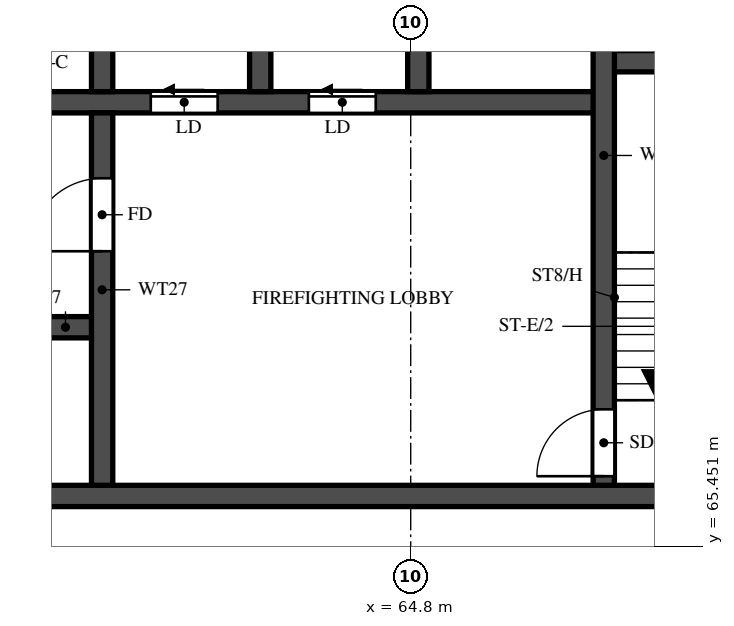
"""IFC4 building model, lengths in metres.
Left out: names, types, materials, properties, quantities, classifications, styles, units other than length and angle.
Written with IfcOpenShell. Run it as: python <this file> out.ifc"""

import sys

from ifc_helpers import new_model, si_unit, direction, frame, frame_2d, origin, place, context, subcontext, project, spatial, rectangle, extrude, element, fill, save


model = new_model("IFC4")
c1 = context("Model", 3, precision=1e-05, world=origin(), true_north=direction((0.0, 1.0)))
c2 = subcontext(c1, "Body", "Model", "MODEL_VIEW")
j1 = project(units=[si_unit("LENGTHUNIT", "METRE"), si_unit("PLANEANGLEUNIT", "RADIAN")], contexts=[c1])
p1 = place(None, origin())
s1 = spatial("IfcSite", under=j1, at=p1, CompositionType="ELEMENT")
p2 = place(p1, origin())
s2 = spatial("IfcBuilding", under=s1, at=p2, CompositionType="ELEMENT")
p3 = place(p2, frame((0.0, 0.0, 181.5)))
s3 = spatial("IfcBuildingStorey", under=s2, at=p3, CompositionType="ELEMENT", Elevation=181.5)
p4 = place(p3, frame((29.7, 66.275, 0.0), z_axis=(0.0, 0.0, 1.0), x_axis=(1.0, 0.0, 0.0)))
e1 = element("IfcWall", 1, at=p4, inside=s3, PredefinedType="SHEAR", context=c2, shape_type="SweptSolid", body=[
    extrude(rectangle(XDim=41.4, YDim=0.35, at=frame_2d((20.7, 0.0))), origin(), (0.0, 0.0, 1.0), 3.2),
])
p5 = place(p4, frame((0.925, 0.0, 0.0)))
e2 = element("IfcOpeningElement", 2, at=p5, cuts=e1, PredefinedType="OPENING", context=c2, shape_type="SweptSolid", body=[
    extrude(rectangle(XDim=1.1, YDim=2.1, at=frame_2d((0.55, 1.05))), frame((0.0, 0.185, 0.0), z_axis=(0.0, -1.0, 0.0), x_axis=(1.0, 0.0, 0.0)), (0.0, 0.0, 1.0), 0.37),
])
p6 = place(p4, frame((3.712, 0.0, 0.0)))
e3 = element("IfcOpeningElement", 3, at=p6, cuts=e1, PredefinedType="OPENING", context=c2, shape_type="SweptSolid", body=[
    extrude(rectangle(XDim=1.8, YDim=2.1, at=frame_2d((0.9, 1.05))), frame((0.0, 0.185, 0.0), z_axis=(0.0, -1.0, 0.0), x_axis=(1.0, 0.0, 0.0)), (0.0, 0.0, 1.0), 0.37),
])
p7 = place(p3, frame((35.625, 69.05, 0.0), z_axis=(0.0, 0.0, 1.0), x_axis=(1.0, 0.0, 0.0)))
e4 = element("IfcWall", 4, at=p7, inside=s3, PredefinedType="SHEAR", context=c2, shape_type="SweptSolid", body=[
    extrude(rectangle(XDim=24.1, YDim=0.35, at=frame_2d((12.05, 0.0))), origin(), (0.0, 0.0, 1.0), 3.2),
])
p8 = place(p7, frame((1.0, 0.0, 0.0)))
e5 = element("IfcOpeningElement", 5, at=p8, cuts=e4, PredefinedType="OPENING", context=c2, shape_type="SweptSolid", body=[
    extrude(rectangle(XDim=1.1, YDim=2.1, at=frame_2d((0.55, 1.05))), frame((0.0, 0.185, 0.0), z_axis=(0.0, -1.0, 0.0), x_axis=(1.0, 0.0, 0.0)), (0.0, 0.0, 1.0), 0.37),
])
p9 = place(p7, frame((3.75, 0.0, 0.0)))
e6 = element("IfcOpeningElement", 6, at=p9, cuts=e4, PredefinedType="OPENING", context=c2, shape_type="SweptSolid", body=[
    extrude(rectangle(XDim=1.1, YDim=2.1, at=frame_2d((0.55, 1.05))), frame((0.0, 0.185, 0.0), z_axis=(0.0, -1.0, 0.0), x_axis=(1.0, 0.0, 0.0)), (0.0, 0.0, 1.0), 0.37),
])
p10 = place(p7, frame((6.5, 0.0, 0.0)))
e7 = element("IfcOpeningElement", 7, at=p10, cuts=e4, PredefinedType="OPENING", context=c2, shape_type="SweptSolid", body=[
    extrude(rectangle(XDim=1.1, YDim=2.1, at=frame_2d((0.55, 1.05))), frame((0.0, 0.185, 0.0), z_axis=(0.0, -1.0, 0.0), x_axis=(1.0, 0.0, 0.0)), (0.0, 0.0, 1.0), 0.37),
])
p11 = place(p7, frame((9.25, 0.0, 0.0)))
e8 = element("IfcOpeningElement", 8, at=p11, cuts=e4, PredefinedType="OPENING", context=c2, shape_type="SweptSolid", body=[
    extrude(rectangle(XDim=1.1, YDim=2.1, at=frame_2d((0.55, 1.05))), frame((0.0, 0.185, 0.0), z_axis=(0.0, -1.0, 0.0), x_axis=(1.0, 0.0, 0.0)), (0.0, 0.0, 1.0), 0.37),
])
p12 = place(p7, frame((12.0, 0.0, 0.0)))
e9 = element("IfcOpeningElement", 9, at=p12, cuts=e4, PredefinedType="OPENING", context=c2, shape_type="SweptSolid", body=[
    extrude(rectangle(XDim=1.1, YDim=2.1, at=frame_2d((0.55, 1.05))), frame((0.0, 0.185, 0.0), z_axis=(0.0, -1.0, 0.0), x_axis=(1.0, 0.0, 0.0)), (0.0, 0.0, 1.0), 0.37),
])
p13 = place(p7, frame((14.75, 0.0, 0.0)))
e10 = element("IfcOpeningElement", 10, at=p13, cuts=e4, PredefinedType="OPENING", context=c2, shape_type="SweptSolid", body=[
    extrude(rectangle(XDim=1.1, YDim=2.1, at=frame_2d((0.55, 1.05))), frame((0.0, 0.185, 0.0), z_axis=(0.0, -1.0, 0.0), x_axis=(1.0, 0.0, 0.0)), (0.0, 0.0, 1.0), 0.37),
])
p14 = place(p7, frame((17.625, 0.0, 0.0)))
e11 = element("IfcOpeningElement", 11, at=p14, cuts=e4, PredefinedType="OPENING", context=c2, shape_type="SweptSolid", body=[
    extrude(rectangle(XDim=1.1, YDim=2.1, at=frame_2d((0.55, 1.05))), frame((0.0, 0.185, 0.0), z_axis=(0.0, -1.0, 0.0), x_axis=(1.0, 0.0, 0.0)), (0.0, 0.0, 1.0), 0.37),
])
p15 = place(p7, frame((20.625, 0.0, 0.0)))
e12 = element("IfcOpeningElement", 12, at=p15, cuts=e4, PredefinedType="OPENING", context=c2, shape_type="SweptSolid", body=[
    extrude(rectangle(XDim=1.1, YDim=2.1, at=frame_2d((0.55, 1.05))), frame((0.0, 0.185, 0.0), z_axis=(0.0, -1.0, 0.0), x_axis=(1.0, 0.0, 0.0)), (0.0, 0.0, 1.0), 0.37),
])
p16 = place(p3, frame((32.825, 72.75, 0.0), z_axis=(0.0, 0.0, 1.0), x_axis=(1.0, 0.0, 0.0)))
e13 = element("IfcWall", 13, at=p16, inside=s3, PredefinedType="SHEAR", context=c2, shape_type="SweptSolid", body=[
    extrude(rectangle(XDim=35.15, YDim=0.35, at=frame_2d((17.575, 0.0))), origin(), (0.0, 0.0, 1.0), 3.2),
])
p17 = place(p16, frame((19.8, 0.0, 0.0)))
e14 = element("IfcOpeningElement", 14, at=p17, cuts=e13, PredefinedType="OPENING", context=c2, shape_type="SweptSolid", body=[
    extrude(rectangle(XDim=1.1, YDim=2.1, at=frame_2d((0.55, 1.05))), frame((0.0, 0.185, 0.0), z_axis=(0.0, -1.0, 0.0), x_axis=(1.0, 0.0, 0.0)), (0.0, 0.0, 1.0), 0.37),
])
p18 = place(p16, frame((27.7, 0.0, 0.0)))
e15 = element("IfcOpeningElement", 15, at=p18, cuts=e13, PredefinedType="OPENING", context=c2, shape_type="SweptSolid", body=[
    extrude(rectangle(XDim=1.1, YDim=2.1, at=frame_2d((0.55, 1.05))), frame((0.0, 0.185, 0.0), z_axis=(0.0, -1.0, 0.0), x_axis=(1.0, 0.0, 0.0)), (0.0, 0.0, 1.0), 0.37),
])
p19 = place(p16, frame((30.3, 0.0, 0.0)))
e16 = element("IfcOpeningElement", 16, at=p19, cuts=e13, PredefinedType="OPENING", context=c2, shape_type="SweptSolid", body=[
    extrude(rectangle(XDim=1.1, YDim=2.1, at=frame_2d((0.55, 1.05))), frame((0.0, 0.185, 0.0), z_axis=(0.0, -1.0, 0.0), x_axis=(1.0, 0.0, 0.0)), (0.0, 0.0, 1.0), 0.37),
])
p20 = place(p16, frame((3.8, 0.0, 0.0)))
e17 = element("IfcOpeningElement", 17, at=p20, cuts=e13, PredefinedType="OPENING", context=c2, shape_type="SweptSolid", body=[
    extrude(rectangle(XDim=1.1, YDim=2.1, at=frame_2d((0.55, 1.05))), frame((0.0, 0.185, 0.0), z_axis=(0.0, -1.0, 0.0), x_axis=(1.0, 0.0, 0.0)), (0.0, 0.0, 1.0), 0.37),
])
p21 = place(p16, frame((6.55, 0.0, 0.0)))
e18 = element("IfcOpeningElement", 18, at=p21, cuts=e13, PredefinedType="OPENING", context=c2, shape_type="SweptSolid", body=[
    extrude(rectangle(XDim=1.1, YDim=2.1, at=frame_2d((0.55, 1.05))), frame((0.0, 0.185, 0.0), z_axis=(0.0, -1.0, 0.0), x_axis=(1.0, 0.0, 0.0)), (0.0, 0.0, 1.0), 0.37),
])
p22 = place(p16, frame((9.3, 0.0, 0.0)))
e19 = element("IfcOpeningElement", 19, at=p22, cuts=e13, PredefinedType="OPENING", context=c2, shape_type="SweptSolid", body=[
    extrude(rectangle(XDim=1.1, YDim=2.1, at=frame_2d((0.55, 1.05))), frame((0.0, 0.185, 0.0), z_axis=(0.0, -1.0, 0.0), x_axis=(1.0, 0.0, 0.0)), (0.0, 0.0, 1.0), 0.37),
])
p23 = place(p16, frame((12.05, 0.0, 0.0)))
e20 = element("IfcOpeningElement", 20, at=p23, cuts=e13, PredefinedType="OPENING", context=c2, shape_type="SweptSolid", body=[
    extrude(rectangle(XDim=1.1, YDim=2.1, at=frame_2d((0.55, 1.05))), frame((0.0, 0.185, 0.0), z_axis=(0.0, -1.0, 0.0), x_axis=(1.0, 0.0, 0.0)), (0.0, 0.0, 1.0), 0.37),
])
p24 = place(p16, frame((14.8, 0.0, 0.0)))
e21 = element("IfcOpeningElement", 21, at=p24, cuts=e13, PredefinedType="OPENING", context=c2, shape_type="SweptSolid", body=[
    extrude(rectangle(XDim=1.1, YDim=2.1, at=frame_2d((0.55, 1.05))), frame((0.0, 0.185, 0.0), z_axis=(0.0, -1.0, 0.0), x_axis=(1.0, 0.0, 0.0)), (0.0, 0.0, 1.0), 0.37),
])
p25 = place(p16, frame((17.55, 0.0, 0.0)))
e22 = element("IfcOpeningElement", 22, at=p25, cuts=e13, PredefinedType="OPENING", context=c2, shape_type="SweptSolid", body=[
    extrude(rectangle(XDim=1.1, YDim=2.1, at=frame_2d((0.55, 1.05))), frame((0.0, 0.185, 0.0), z_axis=(0.0, -1.0, 0.0), x_axis=(1.0, 0.0, 0.0)), (0.0, 0.0, 1.0), 0.37),
])
p26 = place(p16, frame((0.938, 0.0, 0.0)))
e23 = element("IfcOpeningElement", 23, at=p26, cuts=e13, PredefinedType="OPENING", context=c2, shape_type="SweptSolid", body=[
    extrude(rectangle(XDim=1.1, YDim=2.1, at=frame_2d((0.55, 1.05))), frame((0.0, 0.185, 0.0), z_axis=(0.0, -1.0, 0.0), x_axis=(1.0, 0.0, 0.0)), (0.0, 0.0, 1.0), 0.37),
])
p27 = place(p3, frame((67.975, 73.425, 0.0), z_axis=(0.0, 0.0, 1.0), x_axis=(1.0, 0.0, 0.0)))
e24 = element("IfcWall", 24, at=p27, inside=s3, PredefinedType="SHEAR", context=c2, shape_type="SweptSolid", body=[
    extrude(rectangle(XDim=3.125, YDim=0.35, at=frame_2d((1.562, 0.0))), origin(), (0.0, 0.0, 1.0), 3.2),
])
p28 = place(p3, frame((67.975, 66.45, 0.0), z_axis=(0.0, 0.0, 1.0), x_axis=(0.0, 1.0, 0.0)))
e25 = element("IfcWall", 25, at=p28, inside=s3, PredefinedType="SHEAR", context=c2, shape_type="SweptSolid", body=[
    extrude(rectangle(XDim=10.85, YDim=0.35, at=frame_2d((5.425, 0.0))), origin(), (0.0, 0.0, 1.0), 3.2),
])
p29 = place(p28, frame((0.15, 0.0, 0.0)))
e26 = element("IfcOpeningElement", 26, at=p29, cuts=e25, PredefinedType="OPENING", context=c2, shape_type="SweptSolid", body=[
    extrude(rectangle(XDim=1.1, YDim=2.1, at=frame_2d((0.55, 1.05))), frame((0.0, 0.185, 0.0), z_axis=(0.0, -1.0, 0.0), x_axis=(1.0, 0.0, 0.0)), (0.0, 0.0, 1.0), 0.37),
])
p30 = place(p3, frame((59.725, 66.45, 0.0), z_axis=(0.0, 0.0, 1.0), x_axis=(0.0, 1.0, 0.0)))
e27 = element("IfcWall", 27, at=p30, inside=s3, PredefinedType="SHEAR", context=c2, shape_type="SweptSolid", body=[
    extrude(rectangle(XDim=6.125, YDim=0.35, at=frame_2d((3.062, 0.0))), origin(), (0.0, 0.0, 1.0), 3.2),
])
p31 = place(p30, frame((3.85, 0.0, 0.0)))
e28 = element("IfcOpeningElement", 28, at=p31, cuts=e27, PredefinedType="OPENING", context=c2, shape_type="SweptSolid", body=[
    extrude(rectangle(XDim=1.2, YDim=2.1, at=frame_2d((0.6, 1.05))), frame((0.0, 0.185, 0.0), z_axis=(0.0, -1.0, 0.0), x_axis=(1.0, 0.0, 0.0)), (0.0, 0.0, 1.0), 0.37),
])
for number, where, z_axis, x_axis in (
    (29, (59.725, 72.925, 0.0), (0.0, 0.0, 1.0), (0.0, 1.0, 0.0)),
    (30, (62.325, 72.925, 0.0), (0.0, 0.0, 1.0), (0.0, 1.0, 0.0)),
    (31, (64.925, 72.925, 0.0), (0.0, 0.0, 1.0), (0.0, 1.0, 0.0)),
):
    element("IfcWall", number, at=place(p3, frame(where, z_axis=z_axis, x_axis=x_axis)), inside=s3, PredefinedType="SHEAR", context=c2, shape_type="SweptSolid", body=[
        extrude(rectangle(XDim=2.95, YDim=0.35, at=frame_2d((1.475, 0.0))), origin(), (0.0, 0.0, 1.0), 3.2),
    ])
p32 = place(p29, origin())
e32 = element("IfcDoor", 32, at=p32, inside=s3, OperationType="SINGLE_SWING_LEFT", PredefinedType="DOOR", context=c2, shape_type="SweptSolid", body=[
    extrude(rectangle(XDim=1.1, YDim=2.1, at=frame_2d((0.55, 1.05))), frame((0.0, 0.025, 0.0), z_axis=(0.0, -1.0, 0.0), x_axis=(1.0, 0.0, 0.0)), (0.0, 0.0, 1.0), 0.05),
])
fill(e26, e32)
p33 = place(p31, origin())
e33 = element("IfcDoor", 33, at=p33, inside=s3, OperationType="SINGLE_SWING_LEFT", PredefinedType="DOOR", context=c2, shape_type="SweptSolid", body=[
    extrude(rectangle(XDim=1.2, YDim=2.1, at=frame_2d((0.6, 1.05))), frame((0.0, 0.025, 0.0), z_axis=(0.0, -1.0, 0.0), x_axis=(1.0, 0.0, 0.0)), (0.0, 0.0, 1.0), 0.05),
])
fill(e28, e33)
p34 = place(p18, origin())
e34 = element("IfcDoor", 34, at=p34, inside=s3, OperationType="SLIDING_TO_LEFT", PredefinedType="DOOR", context=c2, shape_type="SweptSolid", body=[
    extrude(rectangle(XDim=1.1, YDim=2.1, at=frame_2d((0.55, 1.05))), frame((0.0, 0.025, 0.0), z_axis=(0.0, -1.0, 0.0), x_axis=(1.0, 0.0, 0.0)), (0.0, 0.0, 1.0), 0.05),
])
fill(e15, e34)
p35 = place(p19, origin())
e35 = element("IfcDoor", 35, at=p35, inside=s3, OperationType="SLIDING_TO_LEFT", PredefinedType="DOOR", context=c2, shape_type="SweptSolid", body=[
    extrude(rectangle(XDim=1.1, YDim=2.1, at=frame_2d((0.55, 1.05))), frame((0.0, 0.025, 0.0), z_axis=(0.0, -1.0, 0.0), x_axis=(1.0, 0.0, 0.0)), (0.0, 0.0, 1.0), 0.05),
])
fill(e16, e35)
save(model, sys.argv[1])
